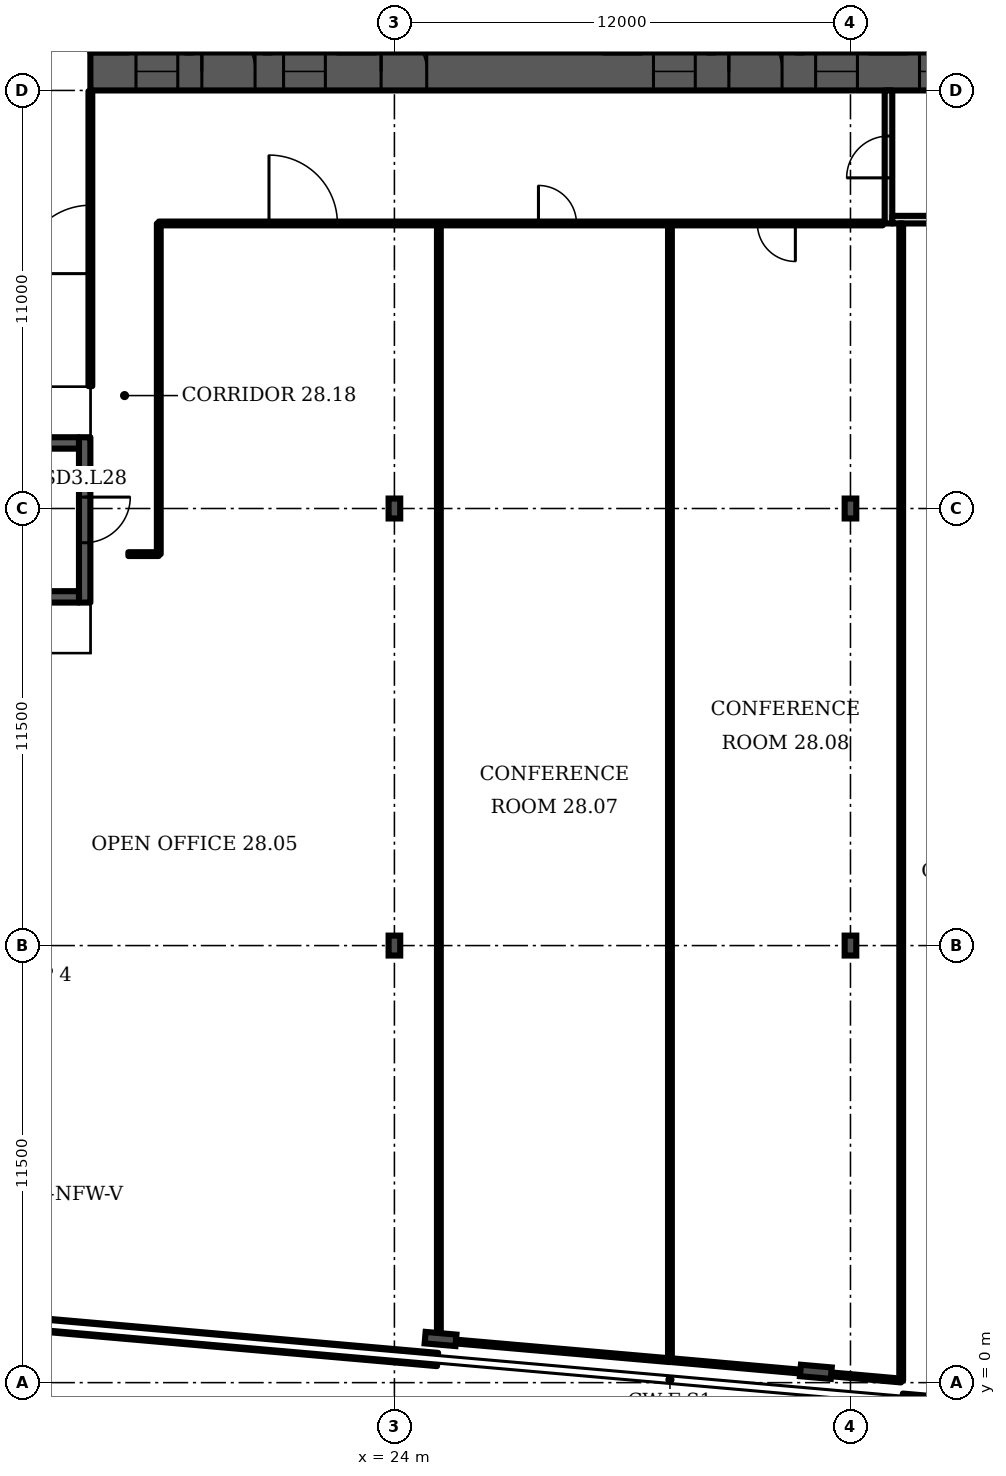
"""IFC4 building model, lengths in metres.
Left out: names, types, materials, properties, quantities, classifications, styles, units other than length and angle.
Written with IfcOpenShell. Run it as: python <this file> out.ifc"""

import sys

from ifc_helpers import new_model, si_unit, direction, frame, frame_2d, origin, origin_2d, place, context, subcontext, project, spatial, rectangle, i_section, extrude, element, fill, save


model = new_model("IFC4")
c1 = context("Model", 3, precision=1e-05, world=origin(), true_north=direction((0.0, 1.0)))
c2 = subcontext(c1, "Body", "Model", "MODEL_VIEW")
j1 = project(units=[si_unit("LENGTHUNIT", "METRE"), si_unit("PLANEANGLEUNIT", "RADIAN")], contexts=[c1])
p1 = place(None, origin())
s1 = spatial("IfcSite", under=j1, at=p1, CompositionType="ELEMENT")
p2 = place(p1, origin())
s2 = spatial("IfcBuilding", under=s1, at=p2, CompositionType="ELEMENT")
p3 = place(p2, frame((0.0, 0.0, 121.9)))
s3 = spatial("IfcBuildingStorey", under=s2, at=p3, CompositionType="ELEMENT", Elevation=121.9)
p4 = place(p3, frame((16.0, 34.5, 0.0), z_axis=(0.0, 0.0, 1.0), x_axis=(1.0, 0.0, 0.0)))
e1 = element("IfcWall", 1, at=p4, inside=s3, PredefinedType="SHEAR", context=c2, shape_type="SweptSolid", body=[
    extrude(rectangle(XDim=49.0, YDim=1.0, at=frame_2d((24.5, 0.0))), origin(), (0.0, 0.0, 1.0), 3.6),
])
p5 = place(p4, frame((1.2, 0.0, 0.0)))
e2 = element("IfcOpeningElement", 2, at=p5, cuts=e1, PredefinedType="OPENING", context=c2, shape_type="SweptSolid", body=[
    extrude(rectangle(XDim=1.1, YDim=2.1, at=frame_2d((0.55, 1.05))), frame((0.0, 0.51, 0.0), z_axis=(0.0, -1.0, 0.0), x_axis=(1.0, 0.0, 0.0)), (0.0, 0.0, 1.0), 1.02),
])
p6 = place(p4, frame((5.083, 0.0, 0.0)))
e3 = element("IfcOpeningElement", 3, at=p6, cuts=e1, PredefinedType="OPENING", context=c2, shape_type="SweptSolid", body=[
    extrude(rectangle(XDim=1.1, YDim=2.1, at=frame_2d((0.55, 1.05))), frame((0.0, 0.51, 0.0), z_axis=(0.0, -1.0, 0.0), x_axis=(1.0, 0.0, 0.0)), (0.0, 0.0, 1.0), 1.02),
])
p7 = place(p4, frame((2.933, 0.0, 0.0)))
e4 = element("IfcOpeningElement", 4, at=p7, cuts=e1, PredefinedType="OPENING", context=c2, shape_type="SweptSolid", body=[
    extrude(rectangle(XDim=1.4, YDim=2.1, at=frame_2d((0.7, 1.05))), frame((0.0, 0.51, 0.0), z_axis=(0.0, -1.0, 0.0), x_axis=(1.0, 0.0, 0.0)), (0.0, 0.0, 1.0), 1.02),
])
p8 = place(p4, frame((7.65, 0.0, 0.0)))
e5 = element("IfcOpeningElement", 5, at=p8, cuts=e1, PredefinedType="OPENING", context=c2, shape_type="SweptSolid", body=[
    extrude(rectangle(XDim=1.2, YDim=2.1, at=frame_2d((0.6, 1.05))), frame((0.0, 0.51, 0.0), z_axis=(0.0, -1.0, 0.0), x_axis=(1.0, 0.0, 0.0)), (0.0, 0.0, 1.0), 1.02),
])
p9 = place(p4, frame((14.817, 0.0, 0.0)))
e6 = element("IfcOpeningElement", 6, at=p9, cuts=e1, PredefinedType="OPENING", context=c2, shape_type="SweptSolid", body=[
    extrude(rectangle(XDim=1.1, YDim=2.1, at=frame_2d((0.55, 1.05))), frame((0.0, 0.51, 0.0), z_axis=(0.0, -1.0, 0.0), x_axis=(1.0, 0.0, 0.0)), (0.0, 0.0, 1.0), 1.02),
])
p10 = place(p4, frame((19.083, 0.0, 0.0)))
e7 = element("IfcOpeningElement", 7, at=p10, cuts=e1, PredefinedType="OPENING", context=c2, shape_type="SweptSolid", body=[
    extrude(rectangle(XDim=1.1, YDim=2.1, at=frame_2d((0.55, 1.05))), frame((0.0, 0.51, 0.0), z_axis=(0.0, -1.0, 0.0), x_axis=(1.0, 0.0, 0.0)), (0.0, 0.0, 1.0), 1.02),
])
p11 = place(p4, frame((16.8, 0.0, 0.0)))
e8 = element("IfcOpeningElement", 8, at=p11, cuts=e1, PredefinedType="OPENING", context=c2, shape_type="SweptSolid", body=[
    extrude(rectangle(XDim=1.4, YDim=2.1, at=frame_2d((0.7, 1.05))), frame((0.0, 0.51, 0.0), z_axis=(0.0, -1.0, 0.0), x_axis=(1.0, 0.0, 0.0)), (0.0, 0.0, 1.0), 1.02),
])
p12 = place(p4, frame((21.817, 0.0, 0.0)))
e9 = element("IfcOpeningElement", 9, at=p12, cuts=e1, PredefinedType="OPENING", context=c2, shape_type="SweptSolid", body=[
    extrude(rectangle(XDim=1.1, YDim=2.1, at=frame_2d((0.55, 1.05))), frame((0.0, 0.51, 0.0), z_axis=(0.0, -1.0, 0.0), x_axis=(1.0, 0.0, 0.0)), (0.0, 0.0, 1.0), 1.02),
])
p13 = place(p4, frame((26.083, 0.0, 0.0)))
e10 = element("IfcOpeningElement", 10, at=p13, cuts=e1, PredefinedType="OPENING", context=c2, shape_type="SweptSolid", body=[
    extrude(rectangle(XDim=1.1, YDim=2.1, at=frame_2d((0.55, 1.05))), frame((0.0, 0.51, 0.0), z_axis=(0.0, -1.0, 0.0), x_axis=(1.0, 0.0, 0.0)), (0.0, 0.0, 1.0), 1.02),
])
p14 = place(p4, frame((33.15, 0.0, 0.0)))
e11 = element("IfcOpeningElement", 11, at=p14, cuts=e1, PredefinedType="OPENING", context=c2, shape_type="SweptSolid", body=[
    extrude(rectangle(XDim=1.2, YDim=2.1, at=frame_2d((0.6, 1.05))), frame((0.0, 0.51, 0.0), z_axis=(0.0, -1.0, 0.0), x_axis=(1.0, 0.0, 0.0)), (0.0, 0.0, 1.0), 1.02),
])
p15 = place(p4, frame((37.8, 0.0, 0.0)))
e12 = element("IfcOpeningElement", 12, at=p15, cuts=e1, PredefinedType="OPENING", context=c2, shape_type="SweptSolid", body=[
    extrude(rectangle(XDim=1.4, YDim=2.1, at=frame_2d((0.7, 1.05))), frame((0.0, 0.51, 0.0), z_axis=(0.0, -1.0, 0.0), x_axis=(1.0, 0.0, 0.0)), (0.0, 0.0, 1.0), 1.02),
])
p16 = place(p4, frame((42.817, 0.0, 0.0)))
e13 = element("IfcOpeningElement", 13, at=p16, cuts=e1, PredefinedType="OPENING", context=c2, shape_type="SweptSolid", body=[
    extrude(rectangle(XDim=1.1, YDim=2.1, at=frame_2d((0.55, 1.05))), frame((0.0, 0.51, 0.0), z_axis=(0.0, -1.0, 0.0), x_axis=(1.0, 0.0, 0.0)), (0.0, 0.0, 1.0), 1.02),
])
p17 = place(p4, frame((46.7, 0.0, 0.0)))
e14 = element("IfcOpeningElement", 14, at=p17, cuts=e1, PredefinedType="OPENING", context=c2, shape_type="SweptSolid", body=[
    extrude(rectangle(XDim=1.1, YDim=2.1, at=frame_2d((0.55, 1.05))), frame((0.0, 0.51, 0.0), z_axis=(0.0, -1.0, 0.0), x_axis=(1.0, 0.0, 0.0)), (0.0, 0.0, 1.0), 1.02),
])
p18 = place(p4, frame((44.667, 0.0, 0.0)))
e15 = element("IfcOpeningElement", 15, at=p18, cuts=e1, PredefinedType="OPENING", context=c2, shape_type="SweptSolid", body=[
    extrude(rectangle(XDim=1.4, YDim=2.1, at=frame_2d((0.7, 1.05))), frame((0.0, 0.51, 0.0), z_axis=(0.0, -1.0, 0.0), x_axis=(1.0, 0.0, 0.0)), (0.0, 0.0, 1.0), 1.02),
])
for number, where, z_axis, x_axis in (
    (16, (25.214, 1.149, 0.0), (0.0, 0.0, 1.0), (-0.087, -0.996, 0.0)),
    (17, (35.089, 0.285, 0.0), (0.0, 0.0, 1.0), (-0.087, -0.996, 0.0)),
):
    element("IfcColumn", number, at=place(p3, frame(where, z_axis=z_axis, x_axis=x_axis)), inside=s3, PredefinedType="COLUMN", context=c2, shape_type="SweptSolid", body=[
        extrude(i_section(OverallWidth=0.303, OverallDepth=0.814, WebThickness=0.021, FlangeThickness=0.04, FilletRadius=0.03, at=origin_2d()), origin(), (0.0, 0.0, 1.0), 3.6),
    ])
for number, where, z_axis, x_axis in (
    (18, (24.0, 11.5, 0.0), (0.0, 0.0, 1.0), (1.0, 0.0, 0.0)),
    (19, (36.0, 11.5, 0.0), (0.0, 0.0, 1.0), (1.0, 0.0, 0.0)),
    (20, (24.0, 23.0, 0.0), (0.0, 0.0, 1.0), (1.0, 0.0, 0.0)),
    (21, (36.0, 23.0, 0.0), (0.0, 0.0, 1.0), (1.0, 0.0, 0.0)),
):
    element("IfcColumn", number, at=place(p3, frame(where, z_axis=z_axis, x_axis=x_axis)), inside=s3, PredefinedType="COLUMN", context=c2, shape_type="SweptSolid", body=[
        extrude(i_section(OverallWidth=0.306, OverallDepth=0.524, WebThickness=0.021, FlangeThickness=0.04, FilletRadius=0.027, at=origin_2d()), origin(), (0.0, 0.0, 1.0), 3.6),
    ])
p19 = place(p3, frame((12.835, 1.685, 0.0), z_axis=(0.0, 0.0, 1.0), x_axis=(0.996192, -0.087173, 0.0)))
e22 = element("IfcWall", 22, at=p19, inside=s3, PredefinedType="SOLIDWALL", context=c2, shape_type="SweptSolid", body=[
    extrude(rectangle(XDim=12.348, YDim=0.35, at=frame_2d((6.174, 0.0))), origin(), (0.0, 0.0, 1.0), 1.0),
])
p20 = place(p3, frame((37.363, -0.461, 0.0), z_axis=(0.0, 0.0, 1.0), x_axis=(0.996194, -0.087159, 0.0)))
e23 = element("IfcWall", 23, at=p20, inside=s3, PredefinedType="SOLIDWALL", context=c2, shape_type="SweptSolid", body=[
    extrude(rectangle(XDim=12.199, YDim=0.35, at=frame_2d((6.099, 0.0))), origin(), (0.0, 0.0, 1.0), 1.0),
])
p21 = place(p3, frame((37.0, 30.5, 0.0), z_axis=(0.0, 0.0, 1.0), x_axis=(0.0, 1.0, 0.0)))
e24 = element("IfcWall", 24, at=p21, inside=s3, PredefinedType="PARTITIONING", context=c2, shape_type="SweptSolid", body=[
    extrude(rectangle(XDim=3.5, YDim=0.2, at=frame_2d((1.75, 0.0))), origin(), (0.0, 0.0, 1.0), 3.2),
])
p22 = place(p21, frame((1.2, 0.0, 0.0)))
e25 = element("IfcOpeningElement", 25, at=p22, cuts=e24, PredefinedType="OPENING", context=c2, shape_type="SweptSolid", body=[
    extrude(rectangle(XDim=1.1, YDim=2.1, at=frame_2d((0.55, 1.05))), frame((0.0, 0.11, 0.0), z_axis=(0.0, -1.0, 0.0), x_axis=(1.0, 0.0, 0.0)), (0.0, 0.0, 1.0), 0.22),
])
p23 = place(p3, frame((37.1, 30.6, 0.0), z_axis=(0.0, 0.0, 1.0), x_axis=(1.0, 0.0, 0.0)))
e26 = element("IfcWall", 26, at=p23, inside=s3, PredefinedType="PARTITIONING", context=c2, shape_type="SweptSolid", body=[
    extrude(rectangle(XDim=2.8, YDim=0.2, at=frame_2d((1.4, 0.0))), origin(), (0.0, 0.0, 1.0), 3.2),
])
p24 = place(p3, frame((15.85, 20.525, 0.0), z_axis=(0.0, 0.0, 1.0), x_axis=(0.0, 1.0, 0.0)))
e27 = element("IfcWall", 27, at=p24, inside=s3, PredefinedType="SHEAR", context=c2, shape_type="SweptSolid", body=[
    extrude(rectangle(XDim=4.35, YDim=0.3, at=frame_2d((2.175, 0.0))), origin(), (0.0, 0.0, 1.0), 3.2),
])
p25 = place(p24, frame((1.575, 0.0, 0.0)))
e28 = element("IfcOpeningElement", 28, at=p25, cuts=e27, PredefinedType="OPENING", context=c2, shape_type="SweptSolid", body=[
    extrude(rectangle(XDim=1.2, YDim=2.1, at=frame_2d((0.6, 1.05))), frame((0.0, 0.16, 0.0), z_axis=(0.0, -1.0, 0.0), x_axis=(1.0, 0.0, 0.0)), (0.0, 0.0, 1.0), 0.32),
])
p26 = place(p3, frame((16.0, 26.22, 0.0), z_axis=(0.0, 0.0, 1.0), x_axis=(0.0, 1.0, 0.0)))
e29 = element("IfcWall", 29, at=p26, inside=s3, PredefinedType="PARTITIONING", context=c2, shape_type="SweptSolid", body=[
    extrude(rectangle(XDim=7.76, YDim=0.1, at=frame_2d((3.88, 0.0))), origin(), (0.0, 0.0, 1.0), 3.2),
])
p27 = place(p26, frame((2.96, 0.0, 0.0)))
e30 = element("IfcOpeningElement", 30, at=p27, cuts=e29, PredefinedType="OPENING", context=c2, shape_type="SweptSolid", body=[
    extrude(rectangle(XDim=1.8, YDim=2.1, at=frame_2d((0.9, 1.05))), frame((0.0, 0.06, 0.0), z_axis=(0.0, -1.0, 0.0), x_axis=(1.0, 0.0, 0.0)), (0.0, 0.0, 1.0), 0.12),
])
p28 = place(p3, frame((17.0, 21.8, 0.0), z_axis=(0.0, 0.0, 1.0), x_axis=(1.0, 0.0, 0.0)))
e31 = element("IfcWall", 31, at=p28, inside=s3, PredefinedType="PARTITIONING", context=c2, shape_type="SweptSolid", body=[
    extrude(rectangle(XDim=0.8, YDim=0.1, at=frame_2d((0.4, 0.0))), origin(), (0.0, 0.0, 1.0), 3.2),
])
p29 = place(p3, frame((17.8, 21.8, 0.0), z_axis=(0.0, 0.0, 1.0), x_axis=(0.0, 1.0, 0.0)))
e32 = element("IfcWall", 32, at=p29, inside=s3, PredefinedType="PARTITIONING", context=c2, shape_type="SweptSolid", body=[
    extrude(rectangle(XDim=8.7, YDim=0.1, at=frame_2d((4.35, 0.0))), origin(), (0.0, 0.0, 1.0), 3.2),
])
p30 = place(p3, frame((17.8, 30.5, 0.0), z_axis=(0.0, 0.0, 1.0), x_axis=(1.0, 0.0, 0.0)))
e33 = element("IfcWall", 33, at=p30, inside=s3, PredefinedType="PARTITIONING", context=c2, shape_type="SweptSolid", body=[
    extrude(rectangle(XDim=19.05, YDim=0.1, at=frame_2d((9.525, 0.0))), origin(), (0.0, 0.0, 1.0), 3.2),
])
p31 = place(p30, frame((2.9, 0.0, 0.0)))
e34 = element("IfcOpeningElement", 34, at=p31, cuts=e33, PredefinedType="OPENING", context=c2, shape_type="SweptSolid", body=[
    extrude(rectangle(XDim=1.8, YDim=2.1, at=frame_2d((0.9, 1.05))), frame((0.0, 0.06, 0.0), z_axis=(0.0, -1.0, 0.0), x_axis=(1.0, 0.0, 0.0)), (0.0, 0.0, 1.0), 0.12),
])
p32 = place(p30, frame((9.99, 0.0, 0.0)))
e35 = element("IfcOpeningElement", 35, at=p32, cuts=e33, PredefinedType="OPENING", context=c2, shape_type="SweptSolid", body=[
    extrude(rectangle(XDim=1.0, YDim=2.1, at=frame_2d((0.5, 1.05))), frame((0.0, 0.06, 0.0), z_axis=(0.0, -1.0, 0.0), x_axis=(1.0, 0.0, 0.0)), (0.0, 0.0, 1.0), 0.12),
])
p33 = place(p30, frame((15.75, 0.0, 0.0)))
e36 = element("IfcOpeningElement", 36, at=p33, cuts=e33, PredefinedType="OPENING", context=c2, shape_type="SweptSolid", body=[
    extrude(rectangle(XDim=1.0, YDim=2.1, at=frame_2d((0.5, 1.05))), frame((0.0, 0.06, 0.0), z_axis=(0.0, -1.0, 0.0), x_axis=(1.0, 0.0, 0.0)), (0.0, 0.0, 1.0), 0.12),
])
p34 = place(p3, frame((25.17, 1.12, 0.0), z_axis=(0.0, 0.0, 1.0), x_axis=(0.0, 1.0, 0.0)))
e37 = element("IfcWall", 37, at=p34, inside=s3, PredefinedType="PARTITIONING", context=c2, shape_type="SweptSolid", body=[
    extrude(rectangle(XDim=29.38, YDim=0.1, at=frame_2d((14.69, 0.0))), origin(), (0.0, 0.0, 1.0), 3.2),
])
p35 = place(p3, frame((31.25, 0.59, 0.0), z_axis=(0.0, 0.0, 1.0), x_axis=(-0.996218, 0.086845, 0.0)))
e38 = element("IfcWall", 38, at=p35, inside=s3, PredefinedType="PARTITIONING", context=c2, shape_type="SweptSolid", body=[
    extrude(rectangle(XDim=6.103, YDim=0.1, at=frame_2d((3.052, 0.0))), origin(), (0.0, 0.0, 1.0), 2.58),
])
p36 = place(p3, frame((31.25, 0.59, 0.0), z_axis=(0.0, 0.0, 1.0), x_axis=(0.0, 1.0, 0.0)))
e39 = element("IfcWall", 39, at=p36, inside=s3, PredefinedType="PARTITIONING", context=c2, shape_type="SweptSolid", body=[
    extrude(rectangle(XDim=29.91, YDim=0.1, at=frame_2d((14.955, 0.0))), origin(), (0.0, 0.0, 1.0), 3.2),
])
p37 = place(p3, frame((37.335, 0.055, 0.0), z_axis=(0.0, 0.0, 1.0), x_axis=(-0.996095, 0.088253, 0.0)))
e40 = element("IfcWall", 40, at=p37, inside=s3, PredefinedType="PARTITIONING", context=c2, shape_type="SweptSolid", body=[
    extrude(rectangle(XDim=6.105, YDim=0.1, at=frame_2d((3.053, 0.0))), origin(), (0.0, 0.0, 1.0), 2.58),
])
p38 = place(p3, frame((37.335, 0.055, 0.0), z_axis=(0.0, 0.0, 1.0), x_axis=(0.0, 1.0, 0.0)))
e41 = element("IfcWall", 41, at=p38, inside=s3, PredefinedType="PARTITIONING", context=c2, shape_type="SweptSolid", body=[
    extrude(rectangle(XDim=30.445, YDim=0.1, at=frame_2d((15.223, 0.0))), origin(), (0.0, 0.0, 1.0), 3.2),
])
for number, where, z_axis, x_axis in (
    (42, (8.2, 20.675, 0.0), (0.0, 0.0, 1.0), (1.0, 0.0, 0.0)),
    (43, (8.2, 24.725, 0.0), (0.0, 0.0, 1.0), (1.0, 0.0, 0.0)),
):
    element("IfcWall", number, at=place(p3, frame(where, z_axis=z_axis, x_axis=x_axis)), inside=s3, PredefinedType="SHEAR", context=c2, shape_type="SweptSolid", body=[
        extrude(rectangle(XDim=7.5, YDim=0.3, at=frame_2d((3.75, 0.0))), origin(), (0.0, 0.0, 1.0), 3.2),
    ])
p39 = place(p5, origin())
e44 = element("IfcDoor", 44, at=p39, inside=s3, OperationType="DOUBLE_DOOR_SLIDING", PredefinedType="DOOR", context=c2, shape_type="SweptSolid", body=[
    extrude(rectangle(XDim=1.1, YDim=2.1, at=frame_2d((0.55, 1.05))), frame((0.0, 0.025, 0.0), z_axis=(0.0, -1.0, 0.0), x_axis=(1.0, 0.0, 0.0)), (0.0, 0.0, 1.0), 0.05),
])
fill(e2, e44)
p40 = place(p6, origin())
e45 = element("IfcDoor", 45, at=p40, inside=s3, OperationType="DOUBLE_DOOR_SLIDING", PredefinedType="DOOR", context=c2, shape_type="SweptSolid", body=[
    extrude(rectangle(XDim=1.1, YDim=2.1, at=frame_2d((0.55, 1.05))), frame((0.0, 0.025, 0.0), z_axis=(0.0, -1.0, 0.0), x_axis=(1.0, 0.0, 0.0)), (0.0, 0.0, 1.0), 0.05),
])
fill(e3, e45)
p41 = place(p7, origin())
e46 = element("IfcDoor", 46, at=p41, inside=s3, OperationType="DOUBLE_DOOR_SINGLE_SWING", PredefinedType="DOOR", context=c2, shape_type="SweptSolid", body=[
    extrude(rectangle(XDim=1.4, YDim=2.1, at=frame_2d((0.7, 1.05))), frame((0.0, 0.025, 0.0), z_axis=(0.0, -1.0, 0.0), x_axis=(1.0, 0.0, 0.0)), (0.0, 0.0, 1.0), 0.05),
])
fill(e4, e46)
p42 = place(p8, origin())
e47 = element("IfcDoor", 47, at=p42, inside=s3, OperationType="SINGLE_SWING_LEFT", PredefinedType="DOOR", context=c2, shape_type="SweptSolid", body=[
    extrude(rectangle(XDim=1.2, YDim=2.1, at=frame_2d((0.6, 1.05))), frame((0.0, 0.025, 0.0), z_axis=(0.0, -1.0, 0.0), x_axis=(1.0, 0.0, 0.0)), (0.0, 0.0, 1.0), 0.05),
])
fill(e5, e47)
p43 = place(p9, origin())
e48 = element("IfcDoor", 48, at=p43, inside=s3, OperationType="DOUBLE_DOOR_SLIDING", PredefinedType="DOOR", context=c2, shape_type="SweptSolid", body=[
    extrude(rectangle(XDim=1.1, YDim=2.1, at=frame_2d((0.55, 1.05))), frame((0.0, 0.025, 0.0), z_axis=(0.0, -1.0, 0.0), x_axis=(1.0, 0.0, 0.0)), (0.0, 0.0, 1.0), 0.05),
])
fill(e6, e48)
p44 = place(p10, origin())
e49 = element("IfcDoor", 49, at=p44, inside=s3, OperationType="DOUBLE_DOOR_SLIDING", PredefinedType="DOOR", context=c2, shape_type="SweptSolid", body=[
    extrude(rectangle(XDim=1.1, YDim=2.1, at=frame_2d((0.55, 1.05))), frame((0.0, 0.025, 0.0), z_axis=(0.0, -1.0, 0.0), x_axis=(1.0, 0.0, 0.0)), (0.0, 0.0, 1.0), 0.05),
])
fill(e7, e49)
p45 = place(p11, origin())
e50 = element("IfcDoor", 50, at=p45, inside=s3, OperationType="DOUBLE_DOOR_SINGLE_SWING", PredefinedType="DOOR", context=c2, shape_type="SweptSolid", body=[
    extrude(rectangle(XDim=1.4, YDim=2.1, at=frame_2d((0.7, 1.05))), frame((0.0, 0.025, 0.0), z_axis=(0.0, -1.0, 0.0), x_axis=(1.0, 0.0, 0.0)), (0.0, 0.0, 1.0), 0.05),
])
fill(e8, e50)
p46 = place(p12, origin())
e51 = element("IfcDoor", 51, at=p46, inside=s3, OperationType="DOUBLE_DOOR_SLIDING", PredefinedType="DOOR", context=c2, shape_type="SweptSolid", body=[
    extrude(rectangle(XDim=1.1, YDim=2.1, at=frame_2d((0.55, 1.05))), frame((0.0, 0.025, 0.0), z_axis=(0.0, -1.0, 0.0), x_axis=(1.0, 0.0, 0.0)), (0.0, 0.0, 1.0), 0.05),
])
fill(e9, e51)
p47 = place(p22, origin())
e52 = element("IfcDoor", 52, at=p47, inside=s3, OperationType="SINGLE_SWING_LEFT", PredefinedType="DOOR", context=c2, shape_type="SweptSolid", body=[
    extrude(rectangle(XDim=1.1, YDim=2.1, at=frame_2d((0.55, 1.05))), frame((0.0, 0.025, 0.0), z_axis=(0.0, -1.0, 0.0), x_axis=(1.0, 0.0, 0.0)), (0.0, 0.0, 1.0), 0.05),
])
fill(e25, e52)
p48 = place(p25, origin())
e53 = element("IfcDoor", 53, at=p48, inside=s3, OperationType="SINGLE_SWING_RIGHT", PredefinedType="DOOR", context=c2, shape_type="SweptSolid", body=[
    extrude(rectangle(XDim=1.2, YDim=2.1, at=frame_2d((0.6, 1.05))), frame((0.0, 0.025, 0.0), z_axis=(0.0, -1.0, 0.0), x_axis=(1.0, 0.0, 0.0)), (0.0, 0.0, 1.0), 0.05),
])
fill(e28, e53)
p49 = place(p27, origin())
e54 = element("IfcDoor", 54, at=p49, inside=s3, OperationType="DOUBLE_DOOR_SINGLE_SWING", PredefinedType="DOOR", context=c2, shape_type="SweptSolid", body=[
    extrude(rectangle(XDim=1.8, YDim=2.1, at=frame_2d((0.9, 1.05))), frame((0.0, 0.025, 0.0), z_axis=(0.0, -1.0, 0.0), x_axis=(1.0, 0.0, 0.0)), (0.0, 0.0, 1.0), 0.05),
])
fill(e30, e54)
p50 = place(p31, origin())
e55 = element("IfcDoor", 55, at=p50, inside=s3, OperationType="DOUBLE_DOOR_SINGLE_SWING", PredefinedType="DOOR", context=c2, shape_type="SweptSolid", body=[
    extrude(rectangle(XDim=1.8, YDim=2.1, at=frame_2d((0.9, 1.05))), frame((0.0, 0.025, 0.0), z_axis=(0.0, -1.0, 0.0), x_axis=(1.0, 0.0, 0.0)), (0.0, 0.0, 1.0), 0.05),
])
fill(e34, e55)
p51 = place(p32, origin())
e56 = element("IfcDoor", 56, at=p51, inside=s3, OperationType="SINGLE_SWING_LEFT", PredefinedType="DOOR", context=c2, shape_type="SweptSolid", body=[
    extrude(rectangle(XDim=1.0, YDim=2.1, at=frame_2d((0.5, 1.05))), frame((0.0, 0.025, 0.0), z_axis=(0.0, -1.0, 0.0), x_axis=(1.0, 0.0, 0.0)), (0.0, 0.0, 1.0), 0.05),
])
fill(e35, e56)
p52 = place(p33, origin())
e57 = element("IfcDoor", 57, at=p52, inside=s3, OperationType="SINGLE_SWING_RIGHT", PredefinedType="DOOR", context=c2, shape_type="SweptSolid", body=[
    extrude(rectangle(XDim=1.0, YDim=2.1, at=frame_2d((0.5, 1.05))), frame((0.0, 0.025, 0.0), z_axis=(0.0, -1.0, 0.0), x_axis=(1.0, 0.0, 0.0)), (0.0, 0.0, 1.0), 0.05),
])
fill(e36, e57)
save(model, sys.argv[1])
